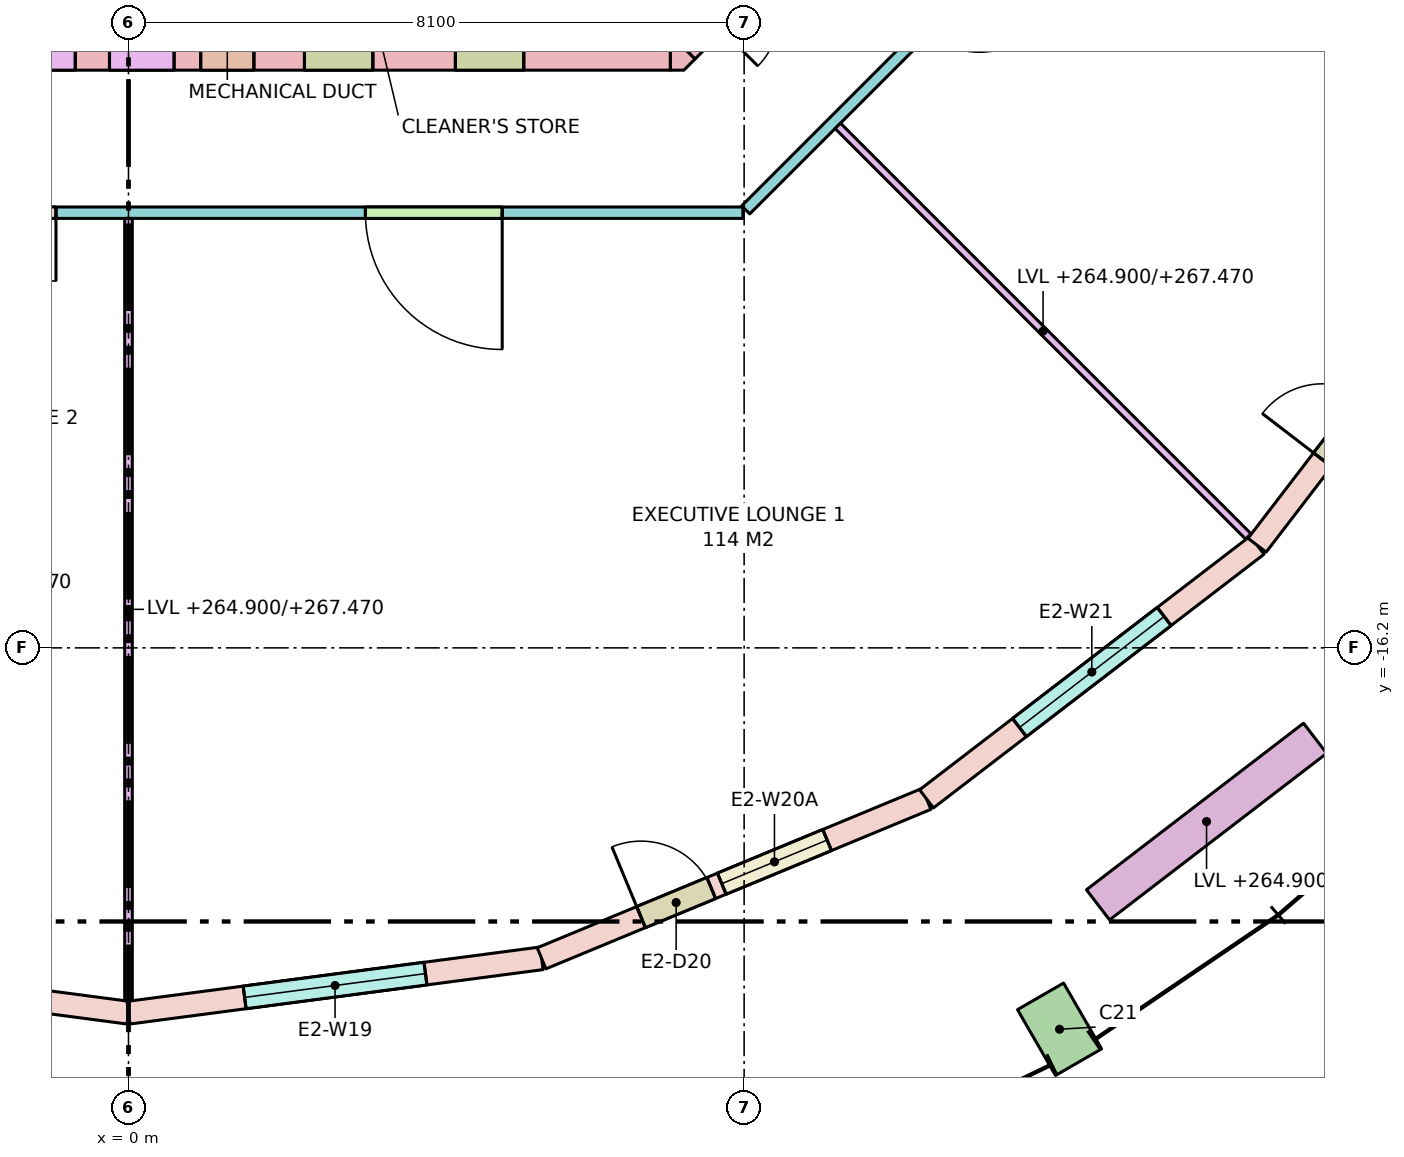
"""IFC4 building model, lengths in metres.
Left out: names, types, materials, properties, quantities, classifications, styles, units other than length and angle.
Written with IfcOpenShell. Run it as: python <this file> out.ifc"""

import sys

from ifc_helpers import new_model, si_unit, direction, frame, frame_2d, origin, origin_2d, place, context, subcontext, project, spatial, polyline, rectangle, outline, extrude, element, fill, save


model = new_model("IFC4")
c1 = context("Model", 3, precision=1e-05, world=origin(), true_north=direction((0.0, 1.0)))
c2 = subcontext(c1, "Body", "Model", "MODEL_VIEW")
j1 = project(units=[si_unit("LENGTHUNIT", "METRE"), si_unit("PLANEANGLEUNIT", "RADIAN")], contexts=[c1])
p1 = place(None, origin())
s1 = spatial("IfcSite", under=j1, at=p1, CompositionType="ELEMENT")
p2 = place(p1, origin())
s2 = spatial("IfcBuilding", under=s1, at=p2, CompositionType="ELEMENT")
p3 = place(p2, frame((0.0, 0.0, 264.9)))
s3 = spatial("IfcBuildingStorey", under=s2, at=p3, CompositionType="ELEMENT", Elevation=264.9)
p4 = place(p3, frame((12.25, -21.218, 0.0), z_axis=(0.0, 0.0, 1.0), x_axis=(0.866025403784, 0.5, 0.0)))
e1 = element("IfcColumn", 1, at=p4, inside=s3, PredefinedType="COLUMN", context=c2, shape_type="SweptSolid", body=[
    extrude(rectangle(XDim=0.7, YDim=1.0, at=origin_2d()), origin(), (0.0, 0.0, 1.0), 3.7),
])
p5 = place(p3, frame((-7.13, -8.35, -0.28), z_axis=(0.0, 0.0, 1.0), x_axis=(1.0, 0.0, 0.0)))
e2 = element("IfcWall", 2, at=p5, inside=s3, PredefinedType="SHEAR", context=c2, shape_type="SweptSolid", body=[
    extrude(rectangle(XDim=14.26, YDim=0.5, at=frame_2d((7.13, 0.0))), origin(), (0.0, 0.0, 1.0), 3.7),
])
p6 = place(p5, frame((8.08, 0.0, 0.28)))
e3 = element("IfcOpeningElement", 3, at=p6, cuts=e2, PredefinedType="OPENING", context=c2, shape_type="SweptSolid", body=[
    extrude(rectangle(XDim=0.7, YDim=2.1, at=frame_2d((0.35, 1.05))), frame((0.0, 0.26, 0.0), z_axis=(0.0, -1.0, 0.0), x_axis=(1.0, 0.0, 0.0)), (0.0, 0.0, 1.0), 0.52),
])
p7 = place(p5, frame((5.58, 0.0, 0.28)))
e4 = element("IfcOpeningElement", 4, at=p7, cuts=e2, PredefinedType="OPENING", context=c2, shape_type="SweptSolid", body=[
    extrude(rectangle(XDim=0.85, YDim=2.1, at=frame_2d((0.425, 1.05))), frame((0.0, 0.26, 0.0), z_axis=(0.0, -1.0, 0.0), x_axis=(1.0, 0.0, 0.0)), (0.0, 0.0, 1.0), 0.52),
])
p8 = place(p5, frame((6.88, 0.0, 0.28)))
e5 = element("IfcOpeningElement", 5, at=p8, cuts=e2, PredefinedType="OPENING", context=c2, shape_type="SweptSolid", body=[
    extrude(rectangle(XDim=0.85, YDim=2.1, at=frame_2d((0.425, 1.05))), frame((0.0, 0.26, 0.0), z_axis=(0.0, -1.0, 0.0), x_axis=(1.0, 0.0, 0.0)), (0.0, 0.0, 1.0), 0.52),
])
p9 = place(p5, frame((9.445, 0.0, 0.28)))
e6 = element("IfcOpeningElement", 6, at=p9, cuts=e2, PredefinedType="OPENING", context=c2, shape_type="SweptSolid", body=[
    extrude(rectangle(XDim=0.9, YDim=2.1, at=frame_2d((0.45, 1.05))), frame((0.0, 0.26, 0.0), z_axis=(0.0, -1.0, 0.0), x_axis=(1.0, 0.0, 0.0)), (0.0, 0.0, 1.0), 0.52),
])
p10 = place(p5, frame((11.431, 0.0, 0.28)))
e7 = element("IfcOpeningElement", 7, at=p10, cuts=e2, PredefinedType="OPENING", context=c2, shape_type="SweptSolid", body=[
    extrude(rectangle(XDim=0.9, YDim=2.1, at=frame_2d((0.45, 1.05))), frame((0.0, 0.26, 0.0), z_axis=(0.0, -1.0, 0.0), x_axis=(1.0, 0.0, 0.0)), (0.0, 0.0, 1.0), 0.52),
])
p11 = place(p3, frame((10.277, -5.277, -0.28), z_axis=(0.0, 0.0, 1.0), x_axis=(-0.707106781187, -0.707106781187, 0.0)))
e8 = element("IfcWall", 8, at=p11, inside=s3, PredefinedType="SHEAR", context=c2, shape_type="SweptSolid", body=[
    extrude(rectangle(XDim=4.243, YDim=0.5, at=frame_2d((2.121, 0.0))), origin(), (0.0, 0.0, 1.0), 3.7),
])
p12 = place(p11, frame((2.823, 0.0, 0.28)))
e9 = element("IfcOpeningElement", 9, at=p12, cuts=e8, PredefinedType="OPENING", context=c2, shape_type="SweptSolid", body=[
    extrude(rectangle(XDim=0.9, YDim=2.1, at=frame_2d((0.45, 1.05))), frame((0.0, 0.26, 0.0), z_axis=(0.0, -1.0, 0.0), x_axis=(1.0, 0.0, 0.0)), (0.0, 0.0, 1.0), 0.52),
])
p13 = place(p11, frame((0.52, 0.0, 0.28)))
e10 = element("IfcOpeningElement", 10, at=p13, cuts=e8, PredefinedType="OPENING", context=c2, shape_type="SweptSolid", body=[
    extrude(rectangle(XDim=0.9, YDim=2.1, at=frame_2d((0.45, 1.05))), frame((0.0, 0.26, 0.0), z_axis=(0.0, -1.0, 0.0), x_axis=(1.0, 0.0, 0.0)), (0.0, 0.0, 1.0), 0.52),
])
p14 = place(p3, frame((0.0, 0.0, -0.28)))
e11 = element("IfcWall", 11, at=p14, inside=s3, PredefinedType="SHEAR", context=c2, shape_type="SweptSolid", body=[
    extrude(outline(polyline([(7.307, -8.6), (7.13, -8.6), (7.13, -8.13), (7.454, -8.454), (7.307, -8.6)])), origin(), (0.0, 0.0, 1.0), 3.7),
])
p15 = place(p3, frame((-5.435, -20.284, 0.0), z_axis=(0.0, 0.0, 1.0), x_axis=(0.991444743541, -0.130527087244, 0.0)))
e12 = element("IfcWall", 12, at=p15, inside=s3, PredefinedType="STANDARD", context=c2, shape_type="SweptSolid", body=[
    extrude(rectangle(XDim=5.482, YDim=0.3, at=frame_2d((2.741, 0.0))), origin(), (0.0, 0.0, 1.0), 3.42),
])
p16 = place(p15, frame((1.416, 0.0, 0.0)))
e13 = element("IfcOpeningElement", 13, at=p16, cuts=e12, PredefinedType="OPENING", context=c2, shape_type="SweptSolid", body=[
    extrude(rectangle(XDim=1.0, YDim=2.4, at=frame_2d((0.5, 1.2))), frame((0.0, 0.16, 0.0), z_axis=(0.0, -1.0, 0.0), x_axis=(1.0, 0.0, 0.0)), (0.0, 0.0, 1.0), 0.32),
])
p17 = place(p15, frame((2.566, 0.0, 0.8)))
e14 = element("IfcOpeningElement", 14, at=p17, cuts=e12, PredefinedType="OPENING", context=c2, shape_type="SweptSolid", body=[
    extrude(rectangle(XDim=1.5, YDim=2.4, at=frame_2d((0.75, 1.2))), frame((0.0, 0.16, 0.0), z_axis=(0.0, -1.0, 0.0), x_axis=(1.0, 0.0, 0.0)), (0.0, 0.0, 1.0), 0.32),
])
p18 = place(p3, frame((0.0, -21.0, 0.0), z_axis=(0.0, 0.0, 1.0), x_axis=(0.991444743541, 0.130527087244, 0.0)))
e15 = element("IfcWall", 15, at=p18, inside=s3, PredefinedType="STANDARD", context=c2, shape_type="SweptSolid", body=[
    extrude(rectangle(XDim=5.482, YDim=0.3, at=frame_2d((2.741, 0.0))), origin(), (0.0, 0.0, 1.0), 3.42),
])
p19 = place(p18, frame((1.541, 0.0, 0.8)))
e16 = element("IfcOpeningElement", 16, at=p19, cuts=e15, PredefinedType="OPENING", context=c2, shape_type="SweptSolid", body=[
    extrude(rectangle(XDim=2.4, YDim=2.4, at=frame_2d((1.2, 1.2))), frame((0.0, 0.16, 0.0), z_axis=(0.0, -1.0, 0.0), x_axis=(1.0, 0.0, 0.0)), (0.0, 0.0, 1.0), 0.32),
])
p20 = place(p3, frame((5.435, -20.284, 0.0), z_axis=(0.0, 0.0, 1.0), x_axis=(0.923877333662, 0.382688740813, 0.0)))
e17 = element("IfcWall", 17, at=p20, inside=s3, PredefinedType="STANDARD", context=c2, shape_type="SweptSolid", body=[
    extrude(rectangle(XDim=5.482, YDim=0.3, at=frame_2d((2.741, 0.0))), origin(), (0.0, 0.0, 1.0), 3.42),
])
p21 = place(p20, frame((1.416, 0.0, 0.0)))
e18 = element("IfcOpeningElement", 18, at=p21, cuts=e17, PredefinedType="OPENING", context=c2, shape_type="SweptSolid", body=[
    extrude(rectangle(XDim=1.0, YDim=2.4, at=frame_2d((0.5, 1.2))), frame((0.0, 0.16, 0.0), z_axis=(0.0, -1.0, 0.0), x_axis=(1.0, 0.0, 0.0)), (0.0, 0.0, 1.0), 0.32),
])
p22 = place(p20, frame((2.566, 0.0, 0.8)))
e19 = element("IfcOpeningElement", 19, at=p22, cuts=e17, PredefinedType="OPENING", context=c2, shape_type="SweptSolid", body=[
    extrude(rectangle(XDim=1.5, YDim=2.4, at=frame_2d((0.75, 1.2))), frame((0.0, 0.16, 0.0), z_axis=(0.0, -1.0, 0.0), x_axis=(1.0, 0.0, 0.0)), (0.0, 0.0, 1.0), 0.32),
])
p23 = place(p3, frame((10.5, -18.187, 0.0), z_axis=(0.0, 0.0, 1.0), x_axis=(0.793335336593, 0.608784891166, 0.0)))
e20 = element("IfcWall", 20, at=p23, inside=s3, PredefinedType="STANDARD", context=c2, shape_type="SweptSolid", body=[
    extrude(rectangle(XDim=5.482, YDim=0.3, at=frame_2d((2.741, 0.0))), origin(), (0.0, 0.0, 1.0), 3.42),
])
p24 = place(p23, frame((1.541, 0.0, 0.8)))
e21 = element("IfcOpeningElement", 21, at=p24, cuts=e20, PredefinedType="OPENING", context=c2, shape_type="SweptSolid", body=[
    extrude(rectangle(XDim=2.4, YDim=2.4, at=frame_2d((1.2, 1.2))), frame((0.0, 0.16, 0.0), z_axis=(0.0, -1.0, 0.0), x_axis=(1.0, 0.0, 0.0)), (0.0, 0.0, 1.0), 0.32),
])
p25 = place(p3, frame((14.849, -14.849, 0.0), z_axis=(0.0, 0.0, 1.0), x_axis=(0.608784891166, 0.793335336593, 0.0)))
e22 = element("IfcWall", 22, at=p25, inside=s3, PredefinedType="STANDARD", context=c2, shape_type="SweptSolid", body=[
    extrude(rectangle(XDim=5.482, YDim=0.3, at=frame_2d((2.741, 0.0))), origin(), (0.0, 0.0, 1.0), 3.42),
])
p26 = place(p25, frame((1.416, 0.0, 0.0)))
e23 = element("IfcOpeningElement", 23, at=p26, cuts=e22, PredefinedType="OPENING", context=c2, shape_type="SweptSolid", body=[
    extrude(rectangle(XDim=1.0, YDim=2.4, at=frame_2d((0.5, 1.2))), frame((0.0, 0.16, 0.0), z_axis=(0.0, -1.0, 0.0), x_axis=(1.0, 0.0, 0.0)), (0.0, 0.0, 1.0), 0.32),
])
p27 = place(p25, frame((2.566, 0.0, 0.8)))
e24 = element("IfcOpeningElement", 24, at=p27, cuts=e22, PredefinedType="OPENING", context=c2, shape_type="SweptSolid", body=[
    extrude(rectangle(XDim=1.5, YDim=2.4, at=frame_2d((0.75, 1.2))), frame((0.0, 0.16, 0.0), z_axis=(0.0, -1.0, 0.0), x_axis=(1.0, 0.0, 0.0)), (0.0, 0.0, 1.0), 0.32),
])
p28 = place(p3, frame((12.756, -19.581, 0.0), z_axis=(0.0, 0.0, 1.0), x_axis=(0.793384730612, 0.608720518162, 0.0)))
e25 = element("IfcWall", 25, at=p28, inside=s3, PredefinedType="PARAPET", context=c2, shape_type="SweptSolid", body=[
    extrude(rectangle(XDim=3.6, YDim=0.5, at=frame_2d((1.8, 0.0))), origin(), (0.0, 0.0, 1.0), 0.9),
])
p29 = place(p3, frame((12.438, -6.121, 0.0), z_axis=(0.0, 0.0, 1.0), x_axis=(-0.707106781187, -0.707106781187, 0.0)))
e26 = element("IfcWall", 26, at=p29, inside=s3, PredefinedType="PARTITIONING", context=c2, shape_type="SweptSolid", body=[
    extrude(rectangle(XDim=6.105, YDim=0.15, at=frame_2d((3.053, 0.0))), origin(), (0.0, 0.0, 1.0), 2.57),
])
p30 = place(p29, frame((1.758, 0.0, 0.0)))
e27 = element("IfcOpeningElement", 27, at=p30, cuts=e26, PredefinedType="OPENING", context=c2, shape_type="SweptSolid", body=[
    extrude(rectangle(XDim=1.0, YDim=2.1, at=frame_2d((0.5, 1.05))), frame((0.0, 0.085, 0.0), z_axis=(0.0, -1.0, 0.0), x_axis=(1.0, 0.0, 0.0)), (0.0, 0.0, 1.0), 0.17),
])
p31 = place(p3, frame((8.084, -10.475, 0.0), z_axis=(0.0, 0.0, 1.0), x_axis=(-1.0, 0.0, 0.0)))
e28 = element("IfcWall", 28, at=p31, inside=s3, PredefinedType="PARTITIONING", context=c2, shape_type="SweptSolid", body=[
    extrude(rectangle(XDim=16.167, YDim=0.15, at=frame_2d((8.084, 0.0))), origin(), (0.0, 0.0, 1.0), 2.57),
])
p32 = place(p31, frame((12.015, 0.0, 0.0)))
e29 = element("IfcOpeningElement", 29, at=p32, cuts=e28, PredefinedType="OPENING", context=c2, shape_type="SweptSolid", body=[
    extrude(rectangle(XDim=1.0, YDim=2.1, at=frame_2d((0.5, 1.05))), frame((0.0, 0.085, 0.0), z_axis=(0.0, -1.0, 0.0), x_axis=(1.0, 0.0, 0.0)), (0.0, 0.0, 1.0), 0.17),
])
p33 = place(p31, frame((9.038, 0.0, 0.0)))
e30 = element("IfcOpeningElement", 30, at=p33, cuts=e28, PredefinedType="OPENING", context=c2, shape_type="SweptSolid", body=[
    extrude(rectangle(XDim=0.9, YDim=2.1, at=frame_2d((0.45, 1.05))), frame((0.0, 0.085, 0.0), z_axis=(0.0, -1.0, 0.0), x_axis=(1.0, 0.0, 0.0)), (0.0, 0.0, 1.0), 0.17),
])
p34 = place(p31, frame((3.167, 0.0, 0.0)))
e31 = element("IfcOpeningElement", 31, at=p34, cuts=e28, PredefinedType="OPENING", context=c2, shape_type="SweptSolid", body=[
    extrude(rectangle(XDim=1.8, YDim=2.1, at=frame_2d((0.9, 1.05))), frame((0.0, 0.085, 0.0), z_axis=(0.0, -1.0, 0.0), x_axis=(1.0, 0.0, 0.0)), (0.0, 0.0, 1.0), 0.17),
])
p35 = place(p3, frame((0.0, -10.55, 0.0), z_axis=(0.0, 0.0, 1.0), x_axis=(0.0, -1.0, 0.0)))
e32 = element("IfcWall", 32, at=p35, inside=s3, PredefinedType="PARTITIONING", context=c2, shape_type="SweptSolid", body=[
    extrude(rectangle(XDim=10.287, YDim=0.1, at=frame_2d((5.143, 0.0))), origin(), (0.0, 0.0, 1.0), 2.57),
])
p36 = place(p3, frame((9.333, -9.333, 0.0), z_axis=(0.0, 0.0, 1.0), x_axis=(0.707106781187, -0.707106781187, 0.0)))
e33 = element("IfcWall", 33, at=p36, inside=s3, PredefinedType="PARTITIONING", context=c2, shape_type="SweptSolid", body=[
    extrude(rectangle(XDim=7.639, YDim=0.1, at=frame_2d((3.819, 0.0))), origin(), (0.0, 0.0, 1.0), 2.57),
])
p37 = place(p19, origin())
e34 = element("IfcWindow", 34, at=p37, inside=s3, PartitioningType="SINGLE_PANEL", PredefinedType="WINDOW", context=c2, shape_type="SweptSolid", body=[
    extrude(rectangle(XDim=2.4, YDim=2.4, at=frame_2d((1.2, 1.2))), frame((0.0, 0.03, 0.0), z_axis=(0.0, -1.0, 0.0), x_axis=(1.0, 0.0, 0.0)), (0.0, 0.0, 1.0), 0.06),
])
fill(e16, e34)
p38 = place(p21, origin())
e35 = element("IfcDoor", 35, at=p38, inside=s3, OperationType="SINGLE_SWING_LEFT", PredefinedType="DOOR", context=c2, shape_type="SweptSolid", body=[
    extrude(rectangle(XDim=1.0, YDim=2.4, at=frame_2d((0.5, 1.2))), frame((0.0, 0.025, 0.0), z_axis=(0.0, -1.0, 0.0), x_axis=(1.0, 0.0, 0.0)), (0.0, 0.0, 1.0), 0.05),
])
fill(e18, e35)
p39 = place(p22, origin())
e36 = element("IfcWindow", 36, at=p39, inside=s3, PartitioningType="SINGLE_PANEL", PredefinedType="WINDOW", context=c2, shape_type="SweptSolid", body=[
    extrude(rectangle(XDim=1.5, YDim=2.4, at=frame_2d((0.75, 1.2))), frame((0.0, 0.03, 0.0), z_axis=(0.0, -1.0, 0.0), x_axis=(1.0, 0.0, 0.0)), (0.0, 0.0, 1.0), 0.06),
])
fill(e19, e36)
p40 = place(p24, origin())
e37 = element("IfcWindow", 37, at=p40, inside=s3, PartitioningType="SINGLE_PANEL", PredefinedType="WINDOW", context=c2, shape_type="SweptSolid", body=[
    extrude(rectangle(XDim=2.4, YDim=2.4, at=frame_2d((1.2, 1.2))), frame((0.0, 0.03, 0.0), z_axis=(0.0, -1.0, 0.0), x_axis=(1.0, 0.0, 0.0)), (0.0, 0.0, 1.0), 0.06),
])
fill(e21, e37)
p41 = place(p26, origin())
e38 = element("IfcDoor", 38, at=p41, inside=s3, OperationType="SINGLE_SWING_LEFT", PredefinedType="DOOR", context=c2, shape_type="SweptSolid", body=[
    extrude(rectangle(XDim=1.0, YDim=2.4, at=frame_2d((0.5, 1.2))), frame((0.0, 0.025, 0.0), z_axis=(0.0, -1.0, 0.0), x_axis=(1.0, 0.0, 0.0)), (0.0, 0.0, 1.0), 0.05),
])
fill(e23, e38)
p42 = place(p6, origin())
e39 = element("IfcDoor", 39, at=p42, inside=s3, OperationType="SINGLE_SWING_RIGHT", PredefinedType="DOOR", context=c2, shape_type="SweptSolid", body=[
    extrude(rectangle(XDim=0.7, YDim=2.1, at=frame_2d((0.35, 1.05))), frame((0.0, 0.025, 0.0), z_axis=(0.0, -1.0, 0.0), x_axis=(1.0, 0.0, 0.0)), (0.0, 0.0, 1.0), 0.05),
])
fill(e3, e39)
p43 = place(p7, origin())
e40 = element("IfcDoor", 40, at=p43, inside=s3, OperationType="SINGLE_SWING_RIGHT", PredefinedType="DOOR", context=c2, shape_type="SweptSolid", body=[
    extrude(rectangle(XDim=0.85, YDim=2.1, at=frame_2d((0.425, 1.05))), frame((0.0, 0.025, 0.0), z_axis=(0.0, -1.0, 0.0), x_axis=(1.0, 0.0, 0.0)), (0.0, 0.0, 1.0), 0.05),
])
fill(e4, e40)
p44 = place(p8, origin())
e41 = element("IfcDoor", 41, at=p44, inside=s3, OperationType="SINGLE_SWING_LEFT", PredefinedType="DOOR", context=c2, shape_type="SweptSolid", body=[
    extrude(rectangle(XDim=0.85, YDim=2.1, at=frame_2d((0.425, 1.05))), frame((0.0, 0.025, 0.0), z_axis=(0.0, -1.0, 0.0), x_axis=(1.0, 0.0, 0.0)), (0.0, 0.0, 1.0), 0.05),
])
fill(e5, e41)
p45 = place(p9, origin())
e42 = element("IfcDoor", 42, at=p45, inside=s3, OperationType="SINGLE_SWING_RIGHT", PredefinedType="DOOR", context=c2, shape_type="SweptSolid", body=[
    extrude(rectangle(XDim=0.9, YDim=2.1, at=frame_2d((0.45, 1.05))), frame((0.0, 0.025, 0.0), z_axis=(0.0, -1.0, 0.0), x_axis=(1.0, 0.0, 0.0)), (0.0, 0.0, 1.0), 0.05),
])
fill(e6, e42)
p46 = place(p10, origin())
e43 = element("IfcDoor", 43, at=p46, inside=s3, OperationType="SINGLE_SWING_LEFT", PredefinedType="DOOR", context=c2, shape_type="SweptSolid", body=[
    extrude(rectangle(XDim=0.9, YDim=2.1, at=frame_2d((0.45, 1.05))), frame((0.0, 0.025, 0.0), z_axis=(0.0, -1.0, 0.0), x_axis=(1.0, 0.0, 0.0)), (0.0, 0.0, 1.0), 0.05),
])
fill(e7, e43)
p47 = place(p33, origin())
e44 = element("IfcDoor", 44, at=p47, inside=s3, OperationType="SINGLE_SWING_LEFT", PredefinedType="DOOR", context=c2, shape_type="SweptSolid", body=[
    extrude(rectangle(XDim=0.9, YDim=2.1, at=frame_2d((0.45, 1.05))), frame((0.0, 0.025, 0.0), z_axis=(0.0, -1.0, 0.0), x_axis=(1.0, 0.0, 0.0)), (0.0, 0.0, 1.0), 0.05),
])
fill(e30, e44)
p48 = place(p34, origin())
e45 = element("IfcDoor", 45, at=p48, inside=s3, OperationType="DOUBLE_DOOR_SINGLE_SWING", PredefinedType="DOOR", context=c2, shape_type="SweptSolid", body=[
    extrude(rectangle(XDim=1.8, YDim=2.1, at=frame_2d((0.9, 1.05))), frame((0.0, 0.025, 0.0), z_axis=(0.0, -1.0, 0.0), x_axis=(1.0, 0.0, 0.0)), (0.0, 0.0, 1.0), 0.05),
])
fill(e31, e45)
save(model, sys.argv[1])
